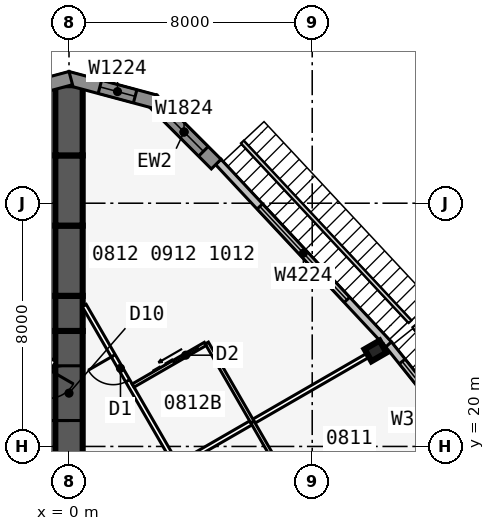
"""IFC4 building model, lengths in metres.
Left out: names, types, materials, properties, quantities, classifications, styles, units other than length and angle.
Written with IfcOpenShell. Run it as: python <this file> out.ifc"""

import sys

from ifc_helpers import new_model, si_unit, direction, frame, frame_2d, origin, origin_2d, place, context, subcontext, project, spatial, polyline, rectangle, i_section, outline, extrude, element, fill, save


model = new_model("IFC4")
c1 = context("Model", 3, precision=1e-05, world=origin(), true_north=direction((0.0, 1.0)))
c2 = subcontext(c1, "Body", "Model", "MODEL_VIEW")
j1 = project(units=[si_unit("LENGTHUNIT", "METRE"), si_unit("PLANEANGLEUNIT", "RADIAN")], contexts=[c1])
p1 = place(None, origin())
s1 = spatial("IfcSite", under=j1, at=p1, CompositionType="ELEMENT")
p2 = place(p1, origin())
s2 = spatial("IfcBuilding", under=s1, at=p2, CompositionType="ELEMENT")
p3 = place(p2, frame((0.0, 0.0, 38.7)))
s3 = spatial("IfcBuildingStorey", under=s2, at=p3, CompositionType="ELEMENT", Elevation=38.7)
p4 = place(p3, frame((0.0, 19.052, 0.0), z_axis=(0.0, 0.0, 1.0), x_axis=(0.0, 1.0, 0.0)))
e1 = element("IfcWall", 1, at=p4, inside=s3, PredefinedType="SHEAR", context=c2, shape_type="SweptSolid", body=[
    extrude(rectangle(XDim=4.746, YDim=0.9, at=frame_2d((2.373, 0.0))), origin(), (0.0, 0.0, 1.0), 3.4),
])
p5 = place(p4, frame((1.8, 0.0, 0.0)))
e2 = element("IfcOpeningElement", 2, at=p5, cuts=e1, PredefinedType="OPENING", context=c2, shape_type="SweptSolid", body=[
    extrude(rectangle(XDim=1.8, YDim=2.13, at=frame_2d((0.9, 1.065))), frame((0.0, 0.46, 0.0), z_axis=(0.0, -1.0, 0.0), x_axis=(1.0, 0.0, 0.0)), (0.0, 0.0, 1.0), 0.92),
])
p6 = place(p3, frame((0.0, 23.799, 0.0), z_axis=(0.0, 0.0, 1.0), x_axis=(0.0, 1.0, 0.0)))
e3 = element("IfcWall", 3, at=p6, inside=s3, PredefinedType="SHEAR", context=c2, shape_type="SweptSolid", body=[
    extrude(rectangle(XDim=1.155, YDim=0.9, at=frame_2d((0.577, 0.0))), origin(), (0.0, 0.0, 1.0), 3.4),
])
p7 = place(p3, frame((0.0, 24.953, 0.0), z_axis=(0.0, 0.0, 1.0), x_axis=(0.0, 1.0, 0.0)))
e4 = element("IfcWall", 4, at=p7, inside=s3, PredefinedType="SHEAR", context=c2, shape_type="SweptSolid", body=[
    extrude(rectangle(XDim=2.309, YDim=0.9, at=frame_2d((1.155, 0.0))), origin(), (0.0, 0.0, 1.0), 3.4),
])
p8 = place(p3, frame((0.0, 27.263, 0.0), z_axis=(0.0, 0.0, 1.0), x_axis=(0.0, 1.0, 0.0)))
e5 = element("IfcWall", 5, at=p8, inside=s3, PredefinedType="SHEAR", context=c2, shape_type="SweptSolid", body=[
    extrude(rectangle(XDim=2.31, YDim=0.9, at=frame_2d((1.155, 0.0))), origin(), (0.0, 0.0, 1.0), 3.4),
])
p9 = place(p3, frame((0.0, 29.572, 0.0), z_axis=(0.0, 0.0, 1.0), x_axis=(0.0, 1.0, 0.0)))
e6 = element("IfcWall", 6, at=p9, inside=s3, PredefinedType="SHEAR", context=c2, shape_type="SweptSolid", body=[
    extrude(rectangle(XDim=2.309, YDim=0.9, at=frame_2d((1.155, 0.0))), origin(), (0.0, 0.0, 1.0), 3.4),
])
p10 = place(p3, frame((10.083, 23.142, 0.0), z_axis=(0.0, 0.0, 1.0), x_axis=(-0.5, 0.866025403784, 0.0)))
e7 = element("IfcColumn", 7, at=p10, inside=s3, PredefinedType="COLUMN", context=c2, shape_type="SweptSolid", body=[
    extrude(i_section(OverallWidth=0.455, OverallDepth=0.569, WebThickness=0.078, FlangeThickness=0.125, at=origin_2d()), origin(), (0.0, 0.0, 1.0), 3.4),
])
p11 = place(p3, frame((13.664, 19.414, 0.0), z_axis=(0.0, 0.0, 1.0), x_axis=(-0.624594965756, 0.780948864364, 0.0)))
e8 = element("IfcWall", 8, at=p11, inside=s3, PredefinedType="STANDARD", context=c2, shape_type="SweptSolid", body=[
    extrude(rectangle(XDim=5.058, YDim=0.25, at=frame_2d((2.529, 0.0))), origin(), (0.0, 0.0, 1.0), 3.235),
])
p12 = place(p11, frame((0.729, 0.0, 0.45)))
e9 = element("IfcOpeningElement", 9, at=p12, cuts=e8, PredefinedType="OPENING", context=c2, shape_type="SweptSolid", body=[
    extrude(rectangle(XDim=3.6, YDim=2.4, at=frame_2d((1.8, 1.2))), frame((0.0, 0.135, 0.0), z_axis=(0.0, -1.0, 0.0), x_axis=(1.0, 0.0, 0.0)), (0.0, 0.0, 1.0), 0.27),
])
p13 = place(p3, frame((10.511, 23.357, 0.0), z_axis=(0.0, 0.0, 1.0), x_axis=(-0.682289646561, 0.731081964075, 0.0)))
e10 = element("IfcWall", 10, at=p13, inside=s3, PredefinedType="STANDARD", context=c2, shape_type="SweptSolid", body=[
    extrude(rectangle(XDim=8.211, YDim=0.25, at=frame_2d((4.105, 0.0))), origin(), (0.0, 0.0, 1.0), 3.235),
])
p14 = place(p13, frame((2.006, 0.0, 0.45)))
e11 = element("IfcOpeningElement", 11, at=p14, cuts=e10, PredefinedType="OPENING", context=c2, shape_type="SweptSolid", body=[
    extrude(rectangle(XDim=4.2, YDim=2.4, at=frame_2d((2.1, 1.2))), frame((0.0, 0.135, 0.0), z_axis=(0.0, -1.0, 0.0), x_axis=(1.0, 0.0, 0.0)), (0.0, 0.0, 1.0), 0.27),
])
p15 = place(p3, frame((4.841, 29.286, 0.0), z_axis=(0.0, 0.0, 1.0), x_axis=(-0.707106781187, 0.707106781187, 0.0)))
e12 = element("IfcWall", 12, at=p15, inside=s3, PredefinedType="SOLIDWALL", context=c2, shape_type="SweptSolid", body=[
    extrude(rectangle(XDim=2.988, YDim=0.45, at=frame_2d((1.494, 0.0))), origin(), (0.0, 0.0, 1.0), 3.235),
])
p16 = place(p15, frame((0.594, 0.0, 0.45)))
e13 = element("IfcOpeningElement", 13, at=p16, cuts=e12, PredefinedType="OPENING", context=c2, shape_type="SweptSolid", body=[
    extrude(rectangle(XDim=1.8, YDim=2.4, at=frame_2d((0.9, 1.2))), frame((0.0, 0.235, 0.0), z_axis=(0.0, -1.0, 0.0), x_axis=(1.0, 0.0, 0.0)), (0.0, 0.0, 1.0), 0.47),
])
p17 = place(p3, frame((2.829, 31.341, 0.0), z_axis=(0.0, 0.0, 1.0), x_axis=(-0.965930548995, 0.258801419081, 0.0)))
e14 = element("IfcWall", 14, at=p17, inside=s3, PredefinedType="SOLIDWALL", context=c2, shape_type="SweptSolid", body=[
    extrude(outline(polyline([(2.989, 0.225), (2.929, 0.225), (2.438, 0.093), (2.402, 0.225), (0.0, 0.225), (0.0, -0.225), (2.989, -0.225), (2.989, 0.225)])), origin(), (0.0, 0.0, 1.0), 3.235),
])
p18 = place(p17, frame((0.676, 0.0, 0.45)))
e15 = element("IfcOpeningElement", 15, at=p18, cuts=e14, PredefinedType="OPENING", context=c2, shape_type="SweptSolid", body=[
    extrude(rectangle(XDim=1.2, YDim=2.4, at=frame_2d((0.6, 1.2))), frame((0.0, 0.235, 0.0), z_axis=(0.0, -1.0, 0.0), x_axis=(1.0, 0.0, 0.0)), (0.0, 0.0, 1.0), 0.47),
])
p19 = place(p3, frame((0.058, 32.114, 0.0), z_axis=(0.0, 0.0, 1.0), x_axis=(-0.965930548995, -0.258801419081, 0.0)))
e16 = element("IfcWall", 16, at=p19, inside=s3, PredefinedType="SOLIDWALL", context=c2, shape_type="SweptSolid", body=[
    extrude(outline(polyline([(2.989, 0.225), (0.586, 0.225), (0.551, 0.093), (0.059, 0.225), (0.0, 0.225), (0.0, -0.225), (2.989, -0.225), (2.989, 0.225)])), origin(), (0.0, 0.0, 1.0), 3.235),
])
p20 = place(p19, frame((1.113, 0.0, 0.45)))
e17 = element("IfcOpeningElement", 17, at=p20, cuts=e16, PredefinedType="OPENING", context=c2, shape_type="SweptSolid", body=[
    extrude(rectangle(XDim=1.2, YDim=2.4, at=frame_2d((0.6, 1.2))), frame((0.0, 0.235, 0.0), z_axis=(0.0, -1.0, 0.0), x_axis=(1.0, 0.0, 0.0)), (0.0, 0.0, 1.0), 0.47),
])
p21 = place(p3, frame((21.586, -11.885, 0.0), z_axis=(0.0, 0.0, 1.0), x_axis=(-0.500001915564, 0.86602429783, 0.0)))
e18 = element("IfcWall", 18, at=p21, inside=s3, PredefinedType="PARTITIONING", context=c2, shape_type="SweptSolid", body=[
    extrude(rectangle(XDim=42.172, YDim=0.15, at=frame_2d((21.086, 0.0))), origin(), (0.0, 0.0, 1.0), 3.235),
])
p22 = place(p21, frame((1.911, 0.0, 0.0)))
e19 = element("IfcOpeningElement", 19, at=p22, cuts=e18, PredefinedType="OPENING", context=c2, shape_type="SweptSolid", body=[
    extrude(rectangle(XDim=0.95, YDim=2.13, at=frame_2d((0.475, 1.065))), frame((0.0, 0.085, 0.0), z_axis=(0.0, -1.0, 0.0), x_axis=(1.0, 0.0, 0.0)), (0.0, 0.0, 1.0), 0.17),
])
p23 = place(p21, frame((7.511, 0.0, 0.0)))
e20 = element("IfcOpeningElement", 20, at=p23, cuts=e18, PredefinedType="OPENING", context=c2, shape_type="SweptSolid", body=[
    extrude(rectangle(XDim=0.95, YDim=2.13, at=frame_2d((0.475, 1.065))), frame((0.0, 0.085, 0.0), z_axis=(0.0, -1.0, 0.0), x_axis=(1.0, 0.0, 0.0)), (0.0, 0.0, 1.0), 0.17),
])
p24 = place(p21, frame((13.711, 0.0, 0.0)))
e21 = element("IfcOpeningElement", 21, at=p24, cuts=e18, PredefinedType="OPENING", context=c2, shape_type="SweptSolid", body=[
    extrude(rectangle(XDim=0.95, YDim=2.13, at=frame_2d((0.475, 1.065))), frame((0.0, 0.085, 0.0), z_axis=(0.0, -1.0, 0.0), x_axis=(1.0, 0.0, 0.0)), (0.0, 0.0, 1.0), 0.17),
])
p25 = place(p21, frame((21.911, 0.0, 0.0)))
e22 = element("IfcOpeningElement", 22, at=p25, cuts=e18, PredefinedType="OPENING", context=c2, shape_type="SweptSolid", body=[
    extrude(rectangle(XDim=0.95, YDim=2.13, at=frame_2d((0.475, 1.065))), frame((0.0, 0.085, 0.0), z_axis=(0.0, -1.0, 0.0), x_axis=(1.0, 0.0, 0.0)), (0.0, 0.0, 1.0), 0.17),
])
p26 = place(p21, frame((28.711, 0.0, 0.0)))
e23 = element("IfcOpeningElement", 23, at=p26, cuts=e18, PredefinedType="OPENING", context=c2, shape_type="SweptSolid", body=[
    extrude(rectangle(XDim=0.95, YDim=2.13, at=frame_2d((0.475, 1.065))), frame((0.0, 0.085, 0.0), z_axis=(0.0, -1.0, 0.0), x_axis=(1.0, 0.0, 0.0)), (0.0, 0.0, 1.0), 0.17),
])
p27 = place(p21, frame((31.911, 0.0, 0.0)))
e24 = element("IfcOpeningElement", 24, at=p27, cuts=e18, PredefinedType="OPENING", context=c2, shape_type="SweptSolid", body=[
    extrude(rectangle(XDim=0.95, YDim=2.13, at=frame_2d((0.475, 1.065))), frame((0.0, 0.085, 0.0), z_axis=(0.0, -1.0, 0.0), x_axis=(1.0, 0.0, 0.0)), (0.0, 0.0, 1.0), 0.17),
])
p28 = place(p21, frame((39.311, 0.0, 0.0)))
e25 = element("IfcOpeningElement", 25, at=p28, cuts=e18, PredefinedType="OPENING", context=c2, shape_type="SweptSolid", body=[
    extrude(rectangle(XDim=0.95, YDim=2.13, at=frame_2d((0.475, 1.065))), frame((0.0, 0.085, 0.0), z_axis=(0.0, -1.0, 0.0), x_axis=(1.0, 0.0, 0.0)), (0.0, 0.0, 1.0), 0.17),
])
p29 = place(p3, frame((3.608, 19.404, 0.0), z_axis=(0.0, 0.0, 1.0), x_axis=(0.866021300503, 0.500007107024, 0.0)))
e26 = element("IfcWall", 26, at=p29, inside=s3, PredefinedType="PARTITIONING", context=c2, shape_type="SweptSolid", body=[
    extrude(rectangle(XDim=7.82, YDim=0.15, at=frame_2d((3.91, 0.0))), origin(), (0.0, 0.0, 1.0), 2.389),
])
for number, where, z_axis, x_axis in (
    (27, (7.533, 18.205, 0.0), (0.0, 0.0, 1.0), (-0.5, 0.866, 0.0)),
    (28, (6.033, 20.803, 0.0), (0.0, 0.0, 1.0), (-0.5, 0.866, 0.0)),
):
    element("IfcWall", number, at=place(p3, frame(where, z_axis=z_axis, x_axis=x_axis)), inside=s3, PredefinedType="PLUMBINGWALL", context=c2, shape_type="SweptSolid", body=[
        extrude(rectangle(XDim=3.0, YDim=0.12, at=frame_2d((1.5, 0.0))), origin(), (0.0, 0.0, 1.0), 3.235),
    ])
p30 = place(p3, frame((2.108, 22.002, 0.0), z_axis=(0.0, 0.0, 1.0), x_axis=(0.866035715982, 0.499982138324, 0.0)))
e29 = element("IfcWall", 29, at=p30, inside=s3, PredefinedType="PLUMBINGWALL", context=c2, shape_type="SweptSolid", body=[
    extrude(rectangle(XDim=2.74, YDim=0.12, at=frame_2d((1.37, 0.0))), origin(), (0.0, 0.0, 1.0), 3.235),
])
p31 = place(p30, frame((1.55, 0.0, 0.0)))
e30 = element("IfcOpeningElement", 30, at=p31, cuts=e29, PredefinedType="OPENING", context=c2, shape_type="SweptSolid", body=[
    extrude(rectangle(XDim=0.9, YDim=2.13, at=frame_2d((0.45, 1.065))), frame((0.0, 0.07, 0.0), z_axis=(0.0, -1.0, 0.0), x_axis=(1.0, 0.0, 0.0)), (0.0, 0.0, 1.0), 0.14),
])
p32 = place(p3, frame((-0.5, 22.836, 0.0), z_axis=(0.0, 0.0, 1.0), x_axis=(-0.500001677587, -0.866024435227, 0.0)))
e31 = element("IfcWall", 31, at=p32, inside=s3, PredefinedType="PARTITIONING", context=c2, shape_type="SweptSolid", body=[
    extrude(rectangle(XDim=39.054, YDim=0.15, at=frame_2d((19.527, 0.0))), origin(), (0.0, 0.0, 1.0), 3.235),
])
p33 = place(p32, frame((0.352, 0.0, 0.0)))
e32 = element("IfcOpeningElement", 32, at=p33, cuts=e31, PredefinedType="OPENING", context=c2, shape_type="SweptSolid", body=[
    extrude(rectangle(XDim=0.95, YDim=2.13, at=frame_2d((0.475, 1.065))), frame((0.0, 0.085, 0.0), z_axis=(0.0, -1.0, 0.0), x_axis=(1.0, 0.0, 0.0)), (0.0, 0.0, 1.0), 0.17),
])
p34 = place(p32, frame((5.952, 0.0, 0.0)))
e33 = element("IfcOpeningElement", 33, at=p34, cuts=e31, PredefinedType="OPENING", context=c2, shape_type="SweptSolid", body=[
    extrude(rectangle(XDim=0.95, YDim=2.13, at=frame_2d((0.475, 1.065))), frame((0.0, 0.085, 0.0), z_axis=(0.0, -1.0, 0.0), x_axis=(1.0, 0.0, 0.0)), (0.0, 0.0, 1.0), 0.17),
])
p35 = place(p32, frame((11.552, 0.0, 0.0)))
e34 = element("IfcOpeningElement", 34, at=p35, cuts=e31, PredefinedType="OPENING", context=c2, shape_type="SweptSolid", body=[
    extrude(rectangle(XDim=0.95, YDim=2.13, at=frame_2d((0.475, 1.065))), frame((0.0, 0.085, 0.0), z_axis=(0.0, -1.0, 0.0), x_axis=(1.0, 0.0, 0.0)), (0.0, 0.0, 1.0), 0.17),
])
p36 = place(p32, frame((21.552, 0.0, 0.0)))
e35 = element("IfcOpeningElement", 35, at=p36, cuts=e31, PredefinedType="OPENING", context=c2, shape_type="SweptSolid", body=[
    extrude(rectangle(XDim=0.95, YDim=2.13, at=frame_2d((0.475, 1.065))), frame((0.0, 0.085, 0.0), z_axis=(0.0, -1.0, 0.0), x_axis=(1.0, 0.0, 0.0)), (0.0, 0.0, 1.0), 0.17),
])
p37 = place(p32, frame((30.952, 0.0, 0.0)))
e36 = element("IfcOpeningElement", 36, at=p37, cuts=e31, PredefinedType="OPENING", context=c2, shape_type="SweptSolid", body=[
    extrude(rectangle(XDim=0.95, YDim=2.13, at=frame_2d((0.475, 1.065))), frame((0.0, 0.085, 0.0), z_axis=(0.0, -1.0, 0.0), x_axis=(1.0, 0.0, 0.0)), (0.0, 0.0, 1.0), 0.17),
])
p38 = place(p32, frame((37.752, 0.0, 0.0)))
e37 = element("IfcOpeningElement", 37, at=p38, cuts=e31, PredefinedType="OPENING", context=c2, shape_type="SweptSolid", body=[
    extrude(rectangle(XDim=0.95, YDim=2.13, at=frame_2d((0.475, 1.065))), frame((0.0, 0.085, 0.0), z_axis=(0.0, -1.0, 0.0), x_axis=(1.0, 0.0, 0.0)), (0.0, 0.0, 1.0), 0.17),
])
p39 = place(p12, origin())
e38 = element("IfcWindow", 38, at=p39, inside=s3, PartitioningType="SINGLE_PANEL", PredefinedType="WINDOW", context=c2, shape_type="SweptSolid", body=[
    extrude(rectangle(XDim=3.6, YDim=2.4, at=frame_2d((1.8, 1.2))), frame((0.0, 0.03, 0.0), z_axis=(0.0, -1.0, 0.0), x_axis=(1.0, 0.0, 0.0)), (0.0, 0.0, 1.0), 0.06),
])
fill(e9, e38)
p40 = place(p14, origin())
e39 = element("IfcWindow", 39, at=p40, inside=s3, PartitioningType="SINGLE_PANEL", PredefinedType="WINDOW", context=c2, shape_type="SweptSolid", body=[
    extrude(rectangle(XDim=4.2, YDim=2.4, at=frame_2d((2.1, 1.2))), frame((0.0, 0.03, 0.0), z_axis=(0.0, -1.0, 0.0), x_axis=(1.0, 0.0, 0.0)), (0.0, 0.0, 1.0), 0.06),
])
fill(e11, e39)
p41 = place(p16, origin())
e40 = element("IfcWindow", 40, at=p41, inside=s3, PartitioningType="SINGLE_PANEL", PredefinedType="WINDOW", context=c2, shape_type="SweptSolid", body=[
    extrude(rectangle(XDim=1.8, YDim=2.4, at=frame_2d((0.9, 1.2))), frame((0.0, 0.03, 0.0), z_axis=(0.0, -1.0, 0.0), x_axis=(1.0, 0.0, 0.0)), (0.0, 0.0, 1.0), 0.06),
])
fill(e13, e40)
p42 = place(p18, origin())
e41 = element("IfcWindow", 41, at=p42, inside=s3, PartitioningType="SINGLE_PANEL", PredefinedType="WINDOW", context=c2, shape_type="SweptSolid", body=[
    extrude(rectangle(XDim=1.2, YDim=2.4, at=frame_2d((0.6, 1.2))), frame((0.0, 0.03, 0.0), z_axis=(0.0, -1.0, 0.0), x_axis=(1.0, 0.0, 0.0)), (0.0, 0.0, 1.0), 0.06),
])
fill(e15, e41)
p43 = place(p31, origin())
e42 = element("IfcDoor", 42, at=p43, inside=s3, OperationType="SLIDING_TO_LEFT", PredefinedType="DOOR", context=c2, shape_type="SweptSolid", body=[
    extrude(rectangle(XDim=0.9, YDim=2.13, at=frame_2d((0.45, 1.065))), frame((0.0, 0.025, 0.0), z_axis=(0.0, -1.0, 0.0), x_axis=(1.0, 0.0, 0.0)), (0.0, 0.0, 1.0), 0.05),
])
fill(e30, e42)
p44 = place(p28, origin())
e43 = element("IfcDoor", 43, at=p44, inside=s3, OperationType="SINGLE_SWING_RIGHT", PredefinedType="DOOR", context=c2, shape_type="SweptSolid", body=[
    extrude(rectangle(XDim=0.95, YDim=2.13, at=frame_2d((0.475, 1.065))), frame((0.0, 0.025, 0.0), z_axis=(0.0, -1.0, 0.0), x_axis=(1.0, 0.0, 0.0)), (0.0, 0.0, 1.0), 0.05),
])
fill(e25, e43)
p45 = place(p5, origin())
e44 = element("IfcDoor", 44, at=p45, inside=s3, OperationType="DOUBLE_DOOR_DOUBLE_SWING", PredefinedType="DOOR", context=c2, shape_type="SweptSolid", body=[
    extrude(rectangle(XDim=1.8, YDim=2.13, at=frame_2d((0.9, 1.065))), frame((0.0, 0.025, 0.0), z_axis=(0.0, -1.0, 0.0), x_axis=(1.0, 0.0, 0.0)), (0.0, 0.0, 1.0), 0.05),
])
fill(e2, e44)
save(model, sys.argv[1])
